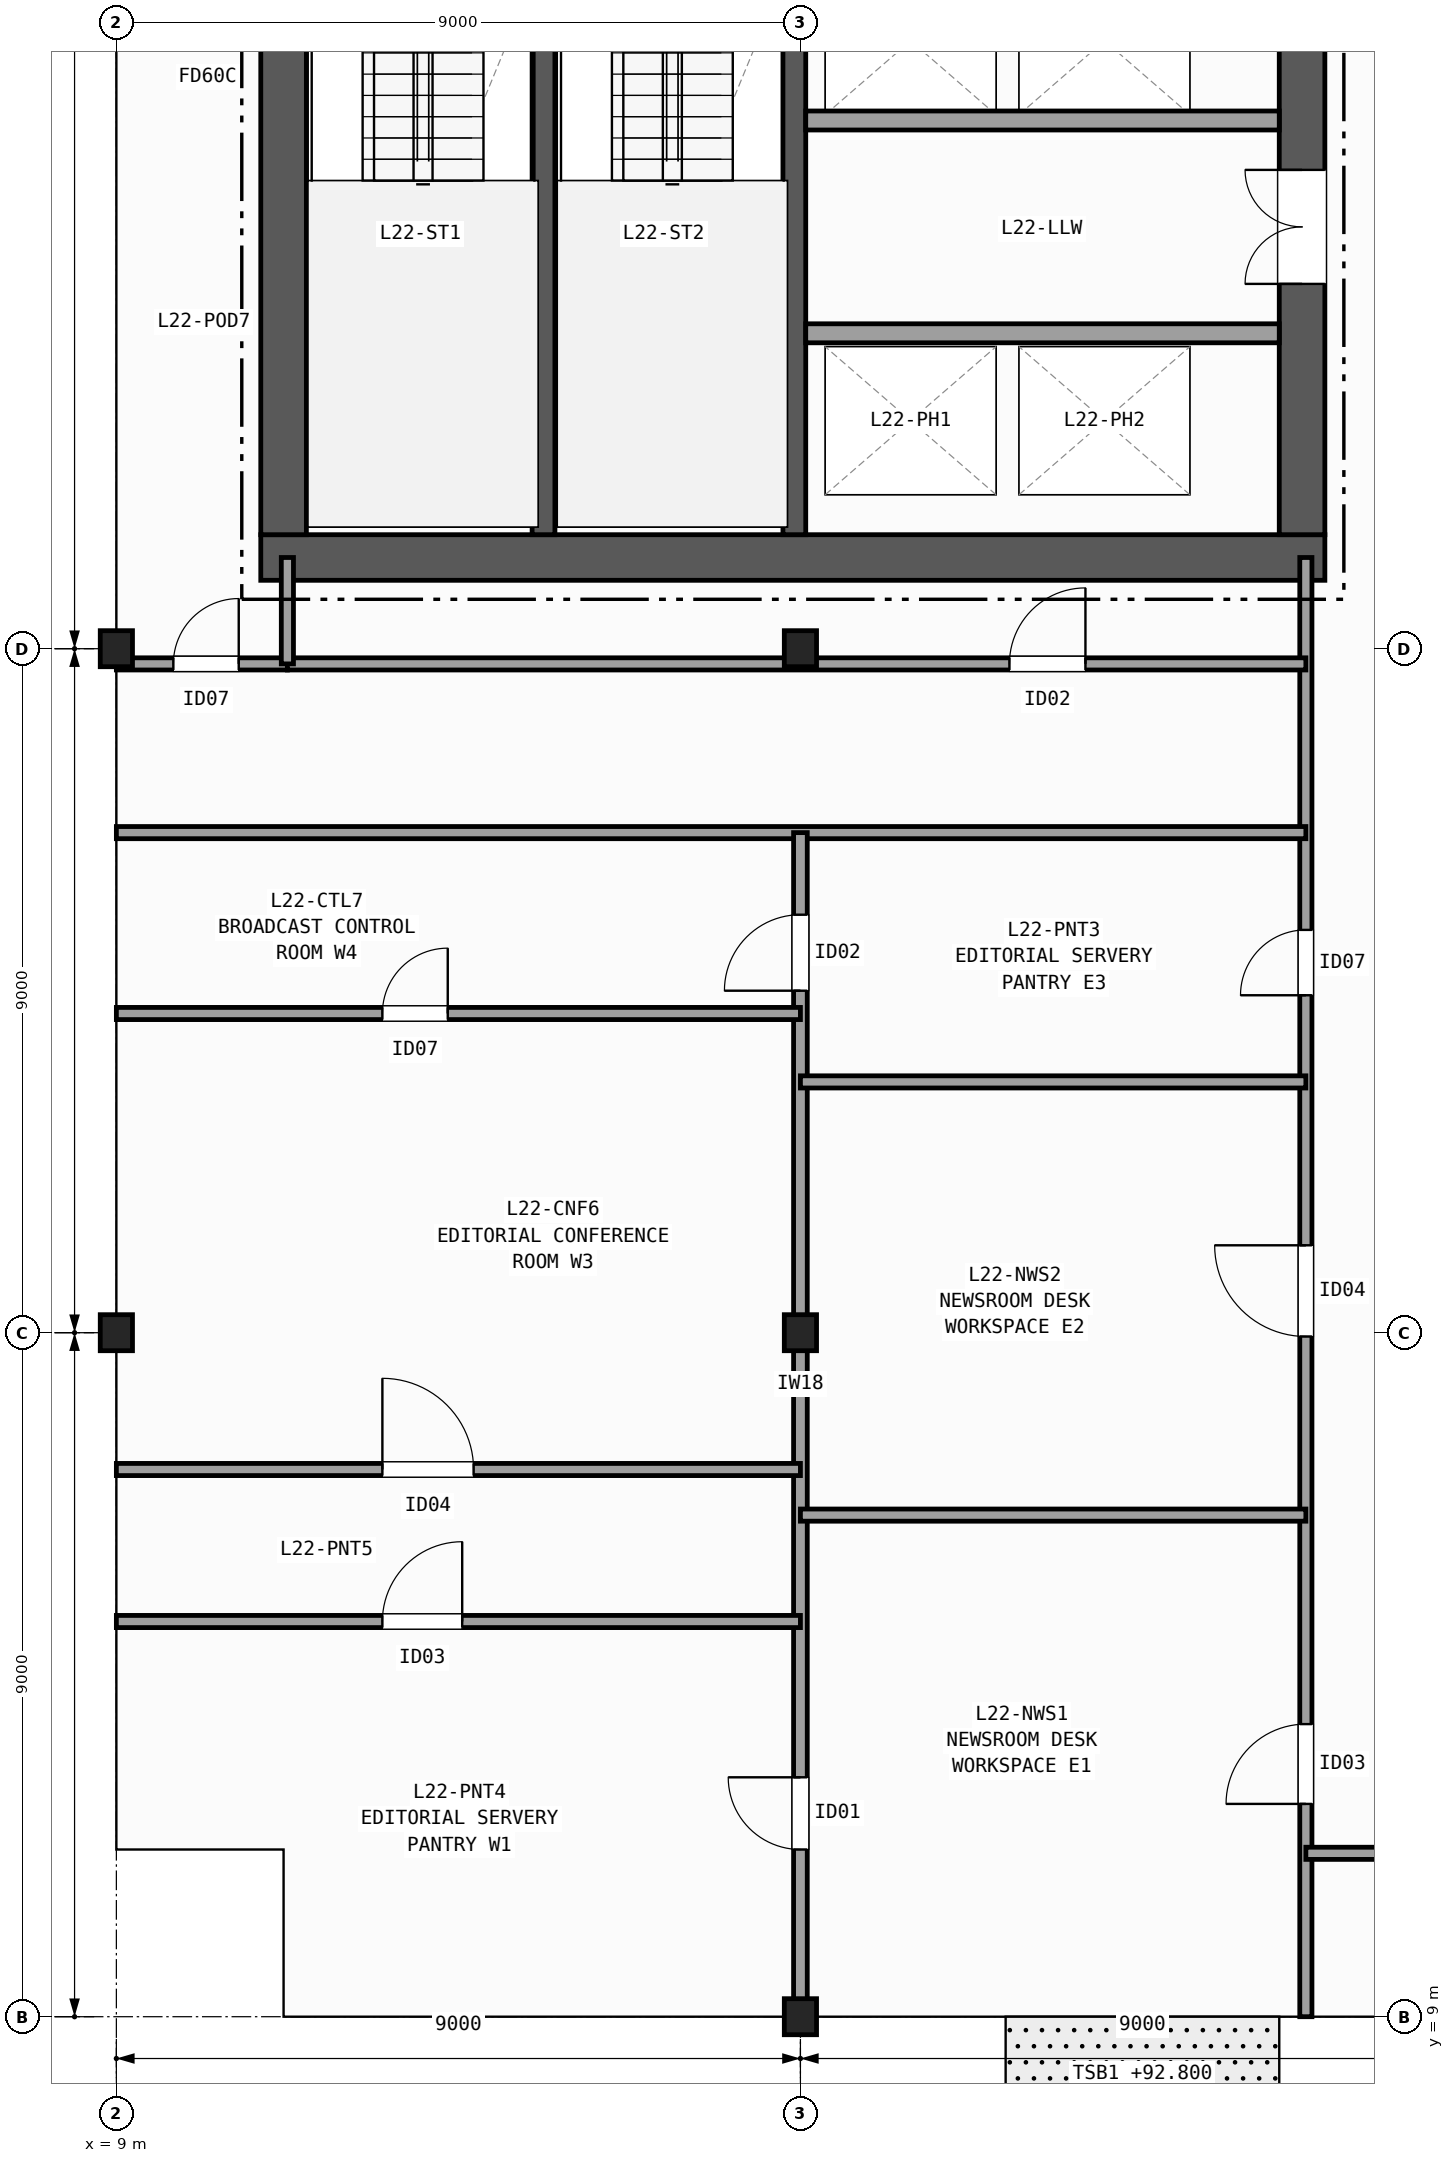
"""IFC4 building model, lengths in metres.
Left out: names, types, materials, properties, quantities, classifications, styles, units other than length and angle.
Written with IfcOpenShell. Run it as: python <this file> out.ifc"""

import sys

from ifc_helpers import new_model, si_unit, direction, frame, frame_2d, origin, origin_2d, place, context, subcontext, project, spatial, rectangle, i_section, extrude, element, fill, save


model = new_model("IFC4")
c1 = context("Model", 3, precision=1e-05, world=origin(), true_north=direction((0.0, 1.0)))
c2 = subcontext(c1, "Body", "Model", "MODEL_VIEW")
j1 = project(units=[si_unit("LENGTHUNIT", "METRE"), si_unit("PLANEANGLEUNIT", "RADIAN")], contexts=[c1])
p1 = place(None, origin())
s1 = spatial("IfcSite", under=j1, at=p1, CompositionType="ELEMENT")
p2 = place(p1, origin())
s2 = spatial("IfcBuilding", under=s1, at=p2, CompositionType="ELEMENT")
p3 = place(p2, frame((0.0, 0.0, 92.8)))
s3 = spatial("IfcBuildingStorey", under=s2, at=p3, CompositionType="ELEMENT", Elevation=92.8)
for number, where, z_axis, x_axis in (
    (1, (9.0, 18.0, 0.0), (0.0, 0.0, 1.0), (1.0, 0.0, 0.0)),
    (2, (9.0, 27.0, 0.0), (0.0, 0.0, 1.0), (1.0, 0.0, 0.0)),
    (3, (18.0, 9.0, 0.0), (0.0, 0.0, 1.0), (1.0, 0.0, 0.0)),
    (4, (18.0, 18.0, 0.0), (0.0, 0.0, 1.0), (1.0, 0.0, 0.0)),
    (5, (18.0, 27.0, 0.0), (0.0, 0.0, 1.0), (1.0, 0.0, 0.0)),
):
    element("IfcColumn", number, at=place(p3, frame(where, z_axis=z_axis, x_axis=x_axis)), inside=s3, PredefinedType="COLUMN", context=c2, shape_type="SweptSolid", body=[
        extrude(i_section(OverallWidth=0.424, OverallDepth=0.474, WebThickness=0.048, FlangeThickness=0.077, FilletRadius=0.015, at=origin_2d()), origin(), (0.0, 0.0, 1.0), 3.7),
    ])
p4 = place(p3, frame((10.9, 28.2, 0.0), z_axis=(0.0, 0.0, 1.0), x_axis=(1.0, 0.0, 0.0)))
e6 = element("IfcWall", 6, at=p4, inside=s3, PredefinedType="SHEAR", context=c2, shape_type="SweptSolid", body=[
    extrude(rectangle(XDim=14.0, YDim=0.6, at=frame_2d((7.0, 0.0))), origin(), (0.0, 0.0, 1.0), 3.42),
])
p5 = place(p3, frame((11.2, 42.1, 0.0), z_axis=(0.0, 0.0, 1.0), x_axis=(0.0, -1.0, 0.0)))
e7 = element("IfcWall", 7, at=p5, inside=s3, PredefinedType="SHEAR", context=c2, shape_type="SweptSolid", body=[
    extrude(rectangle(XDim=13.6, YDim=0.6, at=frame_2d((6.8, 0.0))), origin(), (0.0, 0.0, 1.0), 3.42),
])
p6 = place(p3, frame((24.6, 28.5, 0.0), z_axis=(0.0, 0.0, 1.0), x_axis=(0.0, 1.0, 0.0)))
e8 = element("IfcWall", 8, at=p6, inside=s3, PredefinedType="SHEAR", context=c2, shape_type="SweptSolid", body=[
    extrude(rectangle(XDim=13.6, YDim=0.6, at=frame_2d((6.8, 0.0))), origin(), (0.0, 0.0, 1.0), 3.42),
])
p7 = place(p6, frame((3.3, 0.0, 0.0)))
e9 = element("IfcOpeningElement", 9, at=p7, cuts=e8, PredefinedType="OPENING", context=c2, shape_type="SweptSolid", body=[
    extrude(rectangle(XDim=1.5, YDim=2.2, at=frame_2d((0.75, 1.1))), frame((0.0, 0.31, 0.0), z_axis=(0.0, -1.0, 0.0), x_axis=(1.0, 0.0, 0.0)), (0.0, 0.0, 1.0), 0.62),
])
p8 = place(p6, frame((9.9, 0.0, 0.0)))
e10 = element("IfcOpeningElement", 10, at=p8, cuts=e8, PredefinedType="OPENING", context=c2, shape_type="SweptSolid", body=[
    extrude(rectangle(XDim=0.9, YDim=2.1, at=frame_2d((0.45, 1.05))), frame((0.0, 0.31, 0.0), z_axis=(0.0, -1.0, 0.0), x_axis=(1.0, 0.0, 0.0)), (0.0, 0.0, 1.0), 0.62),
])
p9 = place(p6, frame((12.0, 0.0, 0.0)))
e11 = element("IfcOpeningElement", 11, at=p9, cuts=e8, PredefinedType="OPENING", context=c2, shape_type="SweptSolid", body=[
    extrude(rectangle(XDim=0.9, YDim=2.1, at=frame_2d((0.45, 1.05))), frame((0.0, 0.31, 0.0), z_axis=(0.0, -1.0, 0.0), x_axis=(1.0, 0.0, 0.0)), (0.0, 0.0, 1.0), 0.62),
])
p10 = place(p3, frame((14.62, 28.5, 0.0), z_axis=(0.0, 0.0, 1.0), x_axis=(0.0, 1.0, 0.0)))
e12 = element("IfcWall", 12, at=p10, inside=s3, PredefinedType="SHEAR", context=c2, shape_type="SweptSolid", body=[
    extrude(rectangle(XDim=8.95, YDim=0.3, at=frame_2d((4.475, 0.0))), origin(), (0.0, 0.0, 1.0), 3.42),
])
p11 = place(p3, frame((17.92, 42.1, 0.0), z_axis=(0.0, 0.0, 1.0), x_axis=(0.0, -1.0, 0.0)))
e13 = element("IfcWall", 13, at=p11, inside=s3, PredefinedType="SHEAR", context=c2, shape_type="SweptSolid", body=[
    extrude(rectangle(XDim=13.6, YDim=0.3, at=frame_2d((6.8, 0.0))), origin(), (0.0, 0.0, 1.0), 3.42),
])
p12 = place(p11, frame((1.925, 0.0, 0.0)))
e14 = element("IfcOpeningElement", 14, at=p12, cuts=e13, PredefinedType="OPENING", context=c2, shape_type="SweptSolid", body=[
    extrude(rectangle(XDim=1.15, YDim=2.15, at=frame_2d((0.575, 1.075))), frame((0.0, 0.16, 0.0), z_axis=(0.0, -1.0, 0.0), x_axis=(1.0, 0.0, 0.0)), (0.0, 0.0, 1.0), 0.32),
])
for number, where, z_axis, x_axis in (
    (15, (18.07, 31.15, 0.0), (0.0, 0.0, 1.0), (1.0, 0.0, 0.0)),
    (16, (24.3, 33.95, 0.0), (0.0, 0.0, 1.0), (-1.0, 0.0, 0.0)),
):
    element("IfcWall", number, at=place(p3, frame(where, z_axis=z_axis, x_axis=x_axis)), inside=s3, PredefinedType="PARTITIONING", context=c2, shape_type="SweptSolid", body=[
        extrude(rectangle(XDim=6.23, YDim=0.25, at=frame_2d((3.115, 0.0))), origin(), (0.0, 0.0, 1.0), 3.42),
    ])
p13 = place(p3, frame((9.0, 26.8, 0.0), z_axis=(0.0, 0.0, 1.0), x_axis=(1.0, 0.0, 0.0)))
e17 = element("IfcWall", 17, at=p13, inside=s3, PredefinedType="PARTITIONING", context=c2, shape_type="SweptSolid", body=[
    extrude(rectangle(XDim=2.25, YDim=0.16, at=frame_2d((1.125, 0.0))), origin(), (0.0, 0.0, 1.0), 2.627),
])
p14 = place(p13, frame((0.75, 0.0, 0.0)))
e18 = element("IfcOpeningElement", 18, at=p14, cuts=e17, PredefinedType="OPENING", context=c2, shape_type="SweptSolid", body=[
    extrude(rectangle(XDim=0.86, YDim=2.05, at=frame_2d((0.43, 1.025))), frame((0.0, 0.09, 0.0), z_axis=(0.0, -1.0, 0.0), x_axis=(1.0, 0.0, 0.0)), (0.0, 0.0, 1.0), 0.18),
])
p15 = place(p3, frame((24.65, 9.0, 0.0), z_axis=(0.0, 0.0, 1.0), x_axis=(0.0, 1.0, 0.0)))
e19 = element("IfcWall", 19, at=p15, inside=s3, PredefinedType="PARTITIONING", context=c2, shape_type="SweptSolid", body=[
    extrude(rectangle(XDim=19.2, YDim=0.16, at=frame_2d((9.6, 0.0))), origin(), (0.0, 0.0, 1.0), 2.627),
])
p16 = place(p15, frame((2.8, 0.0, 0.0)))
e20 = element("IfcOpeningElement", 20, at=p16, cuts=e19, PredefinedType="OPENING", context=c2, shape_type="SweptSolid", body=[
    extrude(rectangle(XDim=1.05, YDim=2.15, at=frame_2d((0.525, 1.075))), frame((0.0, 0.09, 0.0), z_axis=(0.0, -1.0, 0.0), x_axis=(1.0, 0.0, 0.0)), (0.0, 0.0, 1.0), 0.18),
])
p17 = place(p15, frame((8.95, 0.0, 0.0)))
e21 = element("IfcOpeningElement", 21, at=p17, cuts=e19, PredefinedType="OPENING", context=c2, shape_type="SweptSolid", body=[
    extrude(rectangle(XDim=1.2, YDim=2.15, at=frame_2d((0.6, 1.075))), frame((0.0, 0.09, 0.0), z_axis=(0.0, -1.0, 0.0), x_axis=(1.0, 0.0, 0.0)), (0.0, 0.0, 1.0), 0.18),
])
p18 = place(p15, frame((13.44, 0.0, 0.0)))
e22 = element("IfcOpeningElement", 22, at=p18, cuts=e19, PredefinedType="OPENING", context=c2, shape_type="SweptSolid", body=[
    extrude(rectangle(XDim=0.86, YDim=2.05, at=frame_2d((0.43, 1.025))), frame((0.0, 0.09, 0.0), z_axis=(0.0, -1.0, 0.0), x_axis=(1.0, 0.0, 0.0)), (0.0, 0.0, 1.0), 0.18),
])
p19 = place(p3, frame((9.0, 24.58, 0.0), z_axis=(0.0, 0.0, 1.0), x_axis=(1.0, 0.0, 0.0)))
e23 = element("IfcWall", 23, at=p19, inside=s3, PredefinedType="PARTITIONING", context=c2, shape_type="SweptSolid", body=[
    extrude(rectangle(XDim=15.65, YDim=0.16, at=frame_2d((7.825, 0.0))), origin(), (0.0, 0.0, 1.0), 2.627),
])
p20 = place(p3, frame((11.25, 26.8, 0.0), z_axis=(0.0, 0.0, 1.0), x_axis=(1.0, 0.0, 0.0)))
e24 = element("IfcWall", 24, at=p20, inside=s3, PredefinedType="PARTITIONING", context=c2, shape_type="SweptSolid", body=[
    extrude(rectangle(XDim=13.4, YDim=0.16, at=frame_2d((6.7, 0.0))), origin(), (0.0, 0.0, 1.0), 2.789),
])
p21 = place(p20, frame((9.5, 0.0, 0.0)))
e25 = element("IfcOpeningElement", 25, at=p21, cuts=e24, PredefinedType="OPENING", context=c2, shape_type="SweptSolid", body=[
    extrude(rectangle(XDim=1.0, YDim=2.1, at=frame_2d((0.5, 1.05))), frame((0.0, 0.09, 0.0), z_axis=(0.0, -1.0, 0.0), x_axis=(1.0, 0.0, 0.0)), (0.0, 0.0, 1.0), 0.18),
])
p22 = place(p3, frame((11.25, 26.8, 0.0), z_axis=(0.0, 0.0, 1.0), x_axis=(0.0, 1.0, 0.0)))
e26 = element("IfcWall", 26, at=p22, inside=s3, PredefinedType="PARTITIONING", context=c2, shape_type="SweptSolid", body=[
    extrude(rectangle(XDim=1.4, YDim=0.16, at=frame_2d((0.7, 0.0))), origin(), (0.0, 0.0, 1.0), 2.789),
])
p23 = place(p3, frame((18.0, 9.0, 0.0), z_axis=(0.0, 0.0, 1.0), x_axis=(0.0, 1.0, 0.0)))
e27 = element("IfcWall", 27, at=p23, inside=s3, PredefinedType="PARTITIONING", context=c2, shape_type="SweptSolid", body=[
    extrude(rectangle(XDim=15.58, YDim=0.18, at=frame_2d((7.79, 0.0))), origin(), (0.0, 0.0, 1.0), 2.627),
])
p24 = place(p23, frame((2.2, 0.0, 0.0)))
e28 = element("IfcOpeningElement", 28, at=p24, cuts=e27, PredefinedType="OPENING", context=c2, shape_type="SweptSolid", body=[
    extrude(rectangle(XDim=0.95, YDim=2.1, at=frame_2d((0.475, 1.05))), frame((0.0, 0.1, 0.0), z_axis=(0.0, -1.0, 0.0), x_axis=(1.0, 0.0, 0.0)), (0.0, 0.0, 1.0), 0.2),
])
p25 = place(p23, frame((13.5, 0.0, 0.0)))
e29 = element("IfcOpeningElement", 29, at=p25, cuts=e27, PredefinedType="OPENING", context=c2, shape_type="SweptSolid", body=[
    extrude(rectangle(XDim=1.0, YDim=2.1, at=frame_2d((0.5, 1.05))), frame((0.0, 0.1, 0.0), z_axis=(0.0, -1.0, 0.0), x_axis=(1.0, 0.0, 0.0)), (0.0, 0.0, 1.0), 0.2),
])
for number, where, z_axis, x_axis in (
    (30, (18.0, 15.6, 0.0), (0.0, 0.0, 1.0), (1.0, 0.0, 0.0)),
    (31, (18.0, 21.3, 0.0), (0.0, 0.0, 1.0), (1.0, 0.0, 0.0)),
):
    element("IfcWall", number, at=place(p3, frame(where, z_axis=z_axis, x_axis=x_axis)), inside=s3, PredefinedType="PARTITIONING", context=c2, shape_type="SweptSolid", body=[
        extrude(rectangle(XDim=6.65, YDim=0.16, at=frame_2d((3.325, 0.0))), origin(), (0.0, 0.0, 1.0), 2.792),
    ])
p26 = place(p3, frame((9.0, 14.2, 0.0), z_axis=(0.0, 0.0, 1.0), x_axis=(1.0, 0.0, 0.0)))
e32 = element("IfcWall", 32, at=p26, inside=s3, PredefinedType="PARTITIONING", context=c2, shape_type="SweptSolid", body=[
    extrude(rectangle(XDim=9.0, YDim=0.16, at=frame_2d((4.5, 0.0))), origin(), (0.0, 0.0, 1.0), 2.792),
])
p27 = place(p26, frame((3.5, 0.0, 0.0)))
e33 = element("IfcOpeningElement", 33, at=p27, cuts=e32, PredefinedType="OPENING", context=c2, shape_type="SweptSolid", body=[
    extrude(rectangle(XDim=1.05, YDim=2.15, at=frame_2d((0.525, 1.075))), frame((0.0, 0.09, 0.0), z_axis=(0.0, -1.0, 0.0), x_axis=(1.0, 0.0, 0.0)), (0.0, 0.0, 1.0), 0.18),
])
p28 = place(p3, frame((9.0, 16.2, 0.0), z_axis=(0.0, 0.0, 1.0), x_axis=(1.0, 0.0, 0.0)))
e34 = element("IfcWall", 34, at=p28, inside=s3, PredefinedType="PARTITIONING", context=c2, shape_type="SweptSolid", body=[
    extrude(rectangle(XDim=9.0, YDim=0.16, at=frame_2d((4.5, 0.0))), origin(), (0.0, 0.0, 1.0), 2.792),
])
p29 = place(p28, frame((3.5, 0.0, 0.0)))
e35 = element("IfcOpeningElement", 35, at=p29, cuts=e34, PredefinedType="OPENING", context=c2, shape_type="SweptSolid", body=[
    extrude(rectangle(XDim=1.2, YDim=2.15, at=frame_2d((0.6, 1.075))), frame((0.0, 0.09, 0.0), z_axis=(0.0, -1.0, 0.0), x_axis=(1.0, 0.0, 0.0)), (0.0, 0.0, 1.0), 0.18),
])
p30 = place(p3, frame((9.0, 22.2, 0.0), z_axis=(0.0, 0.0, 1.0), x_axis=(1.0, 0.0, 0.0)))
e36 = element("IfcWall", 36, at=p30, inside=s3, PredefinedType="PARTITIONING", context=c2, shape_type="SweptSolid", body=[
    extrude(rectangle(XDim=9.0, YDim=0.16, at=frame_2d((4.5, 0.0))), origin(), (0.0, 0.0, 1.0), 2.627),
])
p31 = place(p30, frame((3.5, 0.0, 0.0)))
e37 = element("IfcOpeningElement", 37, at=p31, cuts=e36, PredefinedType="OPENING", context=c2, shape_type="SweptSolid", body=[
    extrude(rectangle(XDim=0.86, YDim=2.05, at=frame_2d((0.43, 1.025))), frame((0.0, 0.09, 0.0), z_axis=(0.0, -1.0, 0.0), x_axis=(1.0, 0.0, 0.0)), (0.0, 0.0, 1.0), 0.18),
])
p32 = place(p3, frame((24.65, 11.15, 0.0), z_axis=(0.0, 0.0, 1.0), x_axis=(1.0, 0.0, 0.0)))
e38 = element("IfcWall", 38, at=p32, inside=s3, PredefinedType="PARTITIONING", context=c2, shape_type="SweptSolid", body=[
    extrude(rectangle(XDim=4.75, YDim=0.16, at=frame_2d((2.375, 0.0))), origin(), (0.0, 0.0, 1.0), 2.792),
])
p33 = place(p32, frame((1.2, 0.0, 0.0)))
e39 = element("IfcOpeningElement", 39, at=p33, cuts=e38, PredefinedType="OPENING", context=c2, shape_type="SweptSolid", body=[
    extrude(rectangle(XDim=1.2, YDim=2.15, at=frame_2d((0.6, 1.075))), frame((0.0, 0.09, 0.0), z_axis=(0.0, -1.0, 0.0), x_axis=(1.0, 0.0, 0.0)), (0.0, 0.0, 1.0), 0.18),
])
p34 = place(p7, origin())
e40 = element("IfcDoor", 40, at=p34, inside=s3, OperationType="DOUBLE_DOOR_SINGLE_SWING", PredefinedType="DOOR", context=c2, shape_type="SweptSolid", body=[
    extrude(rectangle(XDim=1.5, YDim=2.2, at=frame_2d((0.75, 1.1))), frame((0.0, 0.025, 0.0), z_axis=(0.0, -1.0, 0.0), x_axis=(1.0, 0.0, 0.0)), (0.0, 0.0, 1.0), 0.05),
])
fill(e9, e40)
p35 = place(p14, origin())
e41 = element("IfcDoor", 41, at=p35, inside=s3, OperationType="SINGLE_SWING_RIGHT", PredefinedType="DOOR", context=c2, shape_type="SweptSolid", body=[
    extrude(rectangle(XDim=0.86, YDim=2.05, at=frame_2d((0.43, 1.025))), frame((0.0, 0.025, 0.0), z_axis=(0.0, -1.0, 0.0), x_axis=(1.0, 0.0, 0.0)), (0.0, 0.0, 1.0), 0.05),
])
fill(e18, e41)
p36 = place(p21, origin())
e42 = element("IfcDoor", 42, at=p36, inside=s3, OperationType="SINGLE_SWING_RIGHT", PredefinedType="DOOR", context=c2, shape_type="SweptSolid", body=[
    extrude(rectangle(XDim=1.0, YDim=2.1, at=frame_2d((0.5, 1.05))), frame((0.0, 0.025, 0.0), z_axis=(0.0, -1.0, 0.0), x_axis=(1.0, 0.0, 0.0)), (0.0, 0.0, 1.0), 0.05),
])
fill(e25, e42)
p37 = place(p16, origin())
e43 = element("IfcDoor", 43, at=p37, inside=s3, OperationType="SINGLE_SWING_LEFT", PredefinedType="DOOR", context=c2, shape_type="SweptSolid", body=[
    extrude(rectangle(XDim=1.05, YDim=2.15, at=frame_2d((0.525, 1.075))), frame((0.0, 0.025, 0.0), z_axis=(0.0, -1.0, 0.0), x_axis=(1.0, 0.0, 0.0)), (0.0, 0.0, 1.0), 0.05),
])
fill(e20, e43)
p38 = place(p17, origin())
e44 = element("IfcDoor", 44, at=p38, inside=s3, OperationType="SINGLE_SWING_RIGHT", PredefinedType="DOOR", context=c2, shape_type="SweptSolid", body=[
    extrude(rectangle(XDim=1.2, YDim=2.15, at=frame_2d((0.6, 1.075))), frame((0.0, 0.025, 0.0), z_axis=(0.0, -1.0, 0.0), x_axis=(1.0, 0.0, 0.0)), (0.0, 0.0, 1.0), 0.05),
])
fill(e21, e44)
p39 = place(p18, origin())
e45 = element("IfcDoor", 45, at=p39, inside=s3, OperationType="SINGLE_SWING_LEFT", PredefinedType="DOOR", context=c2, shape_type="SweptSolid", body=[
    extrude(rectangle(XDim=0.86, YDim=2.05, at=frame_2d((0.43, 1.025))), frame((0.0, 0.025, 0.0), z_axis=(0.0, -1.0, 0.0), x_axis=(1.0, 0.0, 0.0)), (0.0, 0.0, 1.0), 0.05),
])
fill(e22, e45)
p40 = place(p24, origin())
e46 = element("IfcDoor", 46, at=p40, inside=s3, OperationType="SINGLE_SWING_RIGHT", PredefinedType="DOOR", context=c2, shape_type="SweptSolid", body=[
    extrude(rectangle(XDim=0.95, YDim=2.1, at=frame_2d((0.475, 1.05))), frame((0.0, 0.025, 0.0), z_axis=(0.0, -1.0, 0.0), x_axis=(1.0, 0.0, 0.0)), (0.0, 0.0, 1.0), 0.05),
])
fill(e28, e46)
p41 = place(p25, origin())
e47 = element("IfcDoor", 47, at=p41, inside=s3, OperationType="SINGLE_SWING_LEFT", PredefinedType="DOOR", context=c2, shape_type="SweptSolid", body=[
    extrude(rectangle(XDim=1.0, YDim=2.1, at=frame_2d((0.5, 1.05))), frame((0.0, 0.025, 0.0), z_axis=(0.0, -1.0, 0.0), x_axis=(1.0, 0.0, 0.0)), (0.0, 0.0, 1.0), 0.05),
])
fill(e29, e47)
p42 = place(p27, origin())
e48 = element("IfcDoor", 48, at=p42, inside=s3, OperationType="SINGLE_SWING_RIGHT", PredefinedType="DOOR", context=c2, shape_type="SweptSolid", body=[
    extrude(rectangle(XDim=1.05, YDim=2.15, at=frame_2d((0.525, 1.075))), frame((0.0, 0.025, 0.0), z_axis=(0.0, -1.0, 0.0), x_axis=(1.0, 0.0, 0.0)), (0.0, 0.0, 1.0), 0.05),
])
fill(e33, e48)
p43 = place(p29, origin())
e49 = element("IfcDoor", 49, at=p43, inside=s3, OperationType="SINGLE_SWING_LEFT", PredefinedType="DOOR", context=c2, shape_type="SweptSolid", body=[
    extrude(rectangle(XDim=1.2, YDim=2.15, at=frame_2d((0.6, 1.075))), frame((0.0, 0.025, 0.0), z_axis=(0.0, -1.0, 0.0), x_axis=(1.0, 0.0, 0.0)), (0.0, 0.0, 1.0), 0.05),
])
fill(e35, e49)
p44 = place(p31, origin())
e50 = element("IfcDoor", 50, at=p44, inside=s3, OperationType="SINGLE_SWING_RIGHT", PredefinedType="DOOR", context=c2, shape_type="SweptSolid", body=[
    extrude(rectangle(XDim=0.86, YDim=2.05, at=frame_2d((0.43, 1.025))), frame((0.0, 0.025, 0.0), z_axis=(0.0, -1.0, 0.0), x_axis=(1.0, 0.0, 0.0)), (0.0, 0.0, 1.0), 0.05),
])
fill(e37, e50)
save(model, sys.argv[1])
